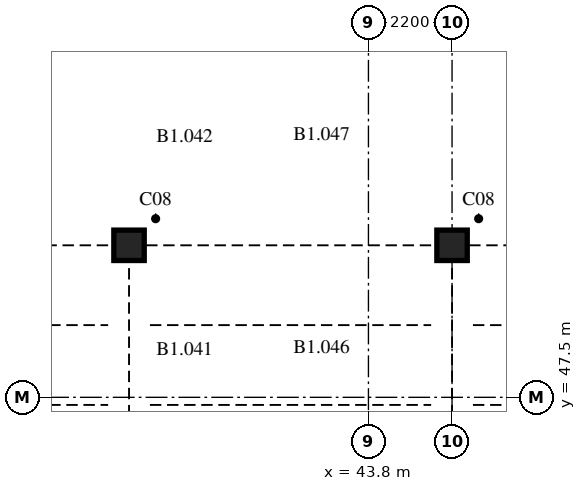
"""IFC4 building model, lengths in metres.
Left out: names, types, materials, properties, quantities, classifications, styles, units other than length and angle.
Written with IfcOpenShell. Run it as: python <this file> out.ifc"""

import sys

from ifc_helpers import new_model, si_unit, direction, frame, origin, origin_2d, place, context, subcontext, project, spatial, rectangle, extrude, element, save


model = new_model("IFC4")
c1 = context("Model", 3, precision=1e-05, world=origin(), true_north=direction((0.0, 1.0)))
c2 = subcontext(c1, "Body", "Model", "MODEL_VIEW")
j1 = project(units=[si_unit("LENGTHUNIT", "METRE"), si_unit("PLANEANGLEUNIT", "RADIAN")], contexts=[c1])
p1 = place(None, origin())
s1 = spatial("IfcSite", under=j1, at=p1, CompositionType="ELEMENT")
p2 = place(p1, origin())
s2 = spatial("IfcBuilding", under=s1, at=p2, CompositionType="ELEMENT")
p3 = place(p2, frame((0.0, 0.0, -4.0)))
s3 = spatial("IfcBuildingStorey", under=s2, at=p3, CompositionType="ELEMENT", Elevation=-4.0)
for number, where, z_axis, x_axis in (
    (1, (37.5, 51.5, 0.0), (0.0, 0.0, 1.0), (1.0, 0.0, 0.0)),
    (2, (46.0, 51.5, 0.0), (0.0, 0.0, 1.0), (1.0, 0.0, 0.0)),
):
    element("IfcColumn", number, at=place(p3, frame(where, z_axis=z_axis, x_axis=x_axis)), inside=s3, PredefinedType="COLUMN", context=c2, shape_type="SweptSolid", body=[
        extrude(rectangle(XDim=0.8, YDim=0.8, at=origin_2d()), origin(), (0.0, 0.0, 1.0), 3.6),
    ])
save(model, sys.argv[1])
